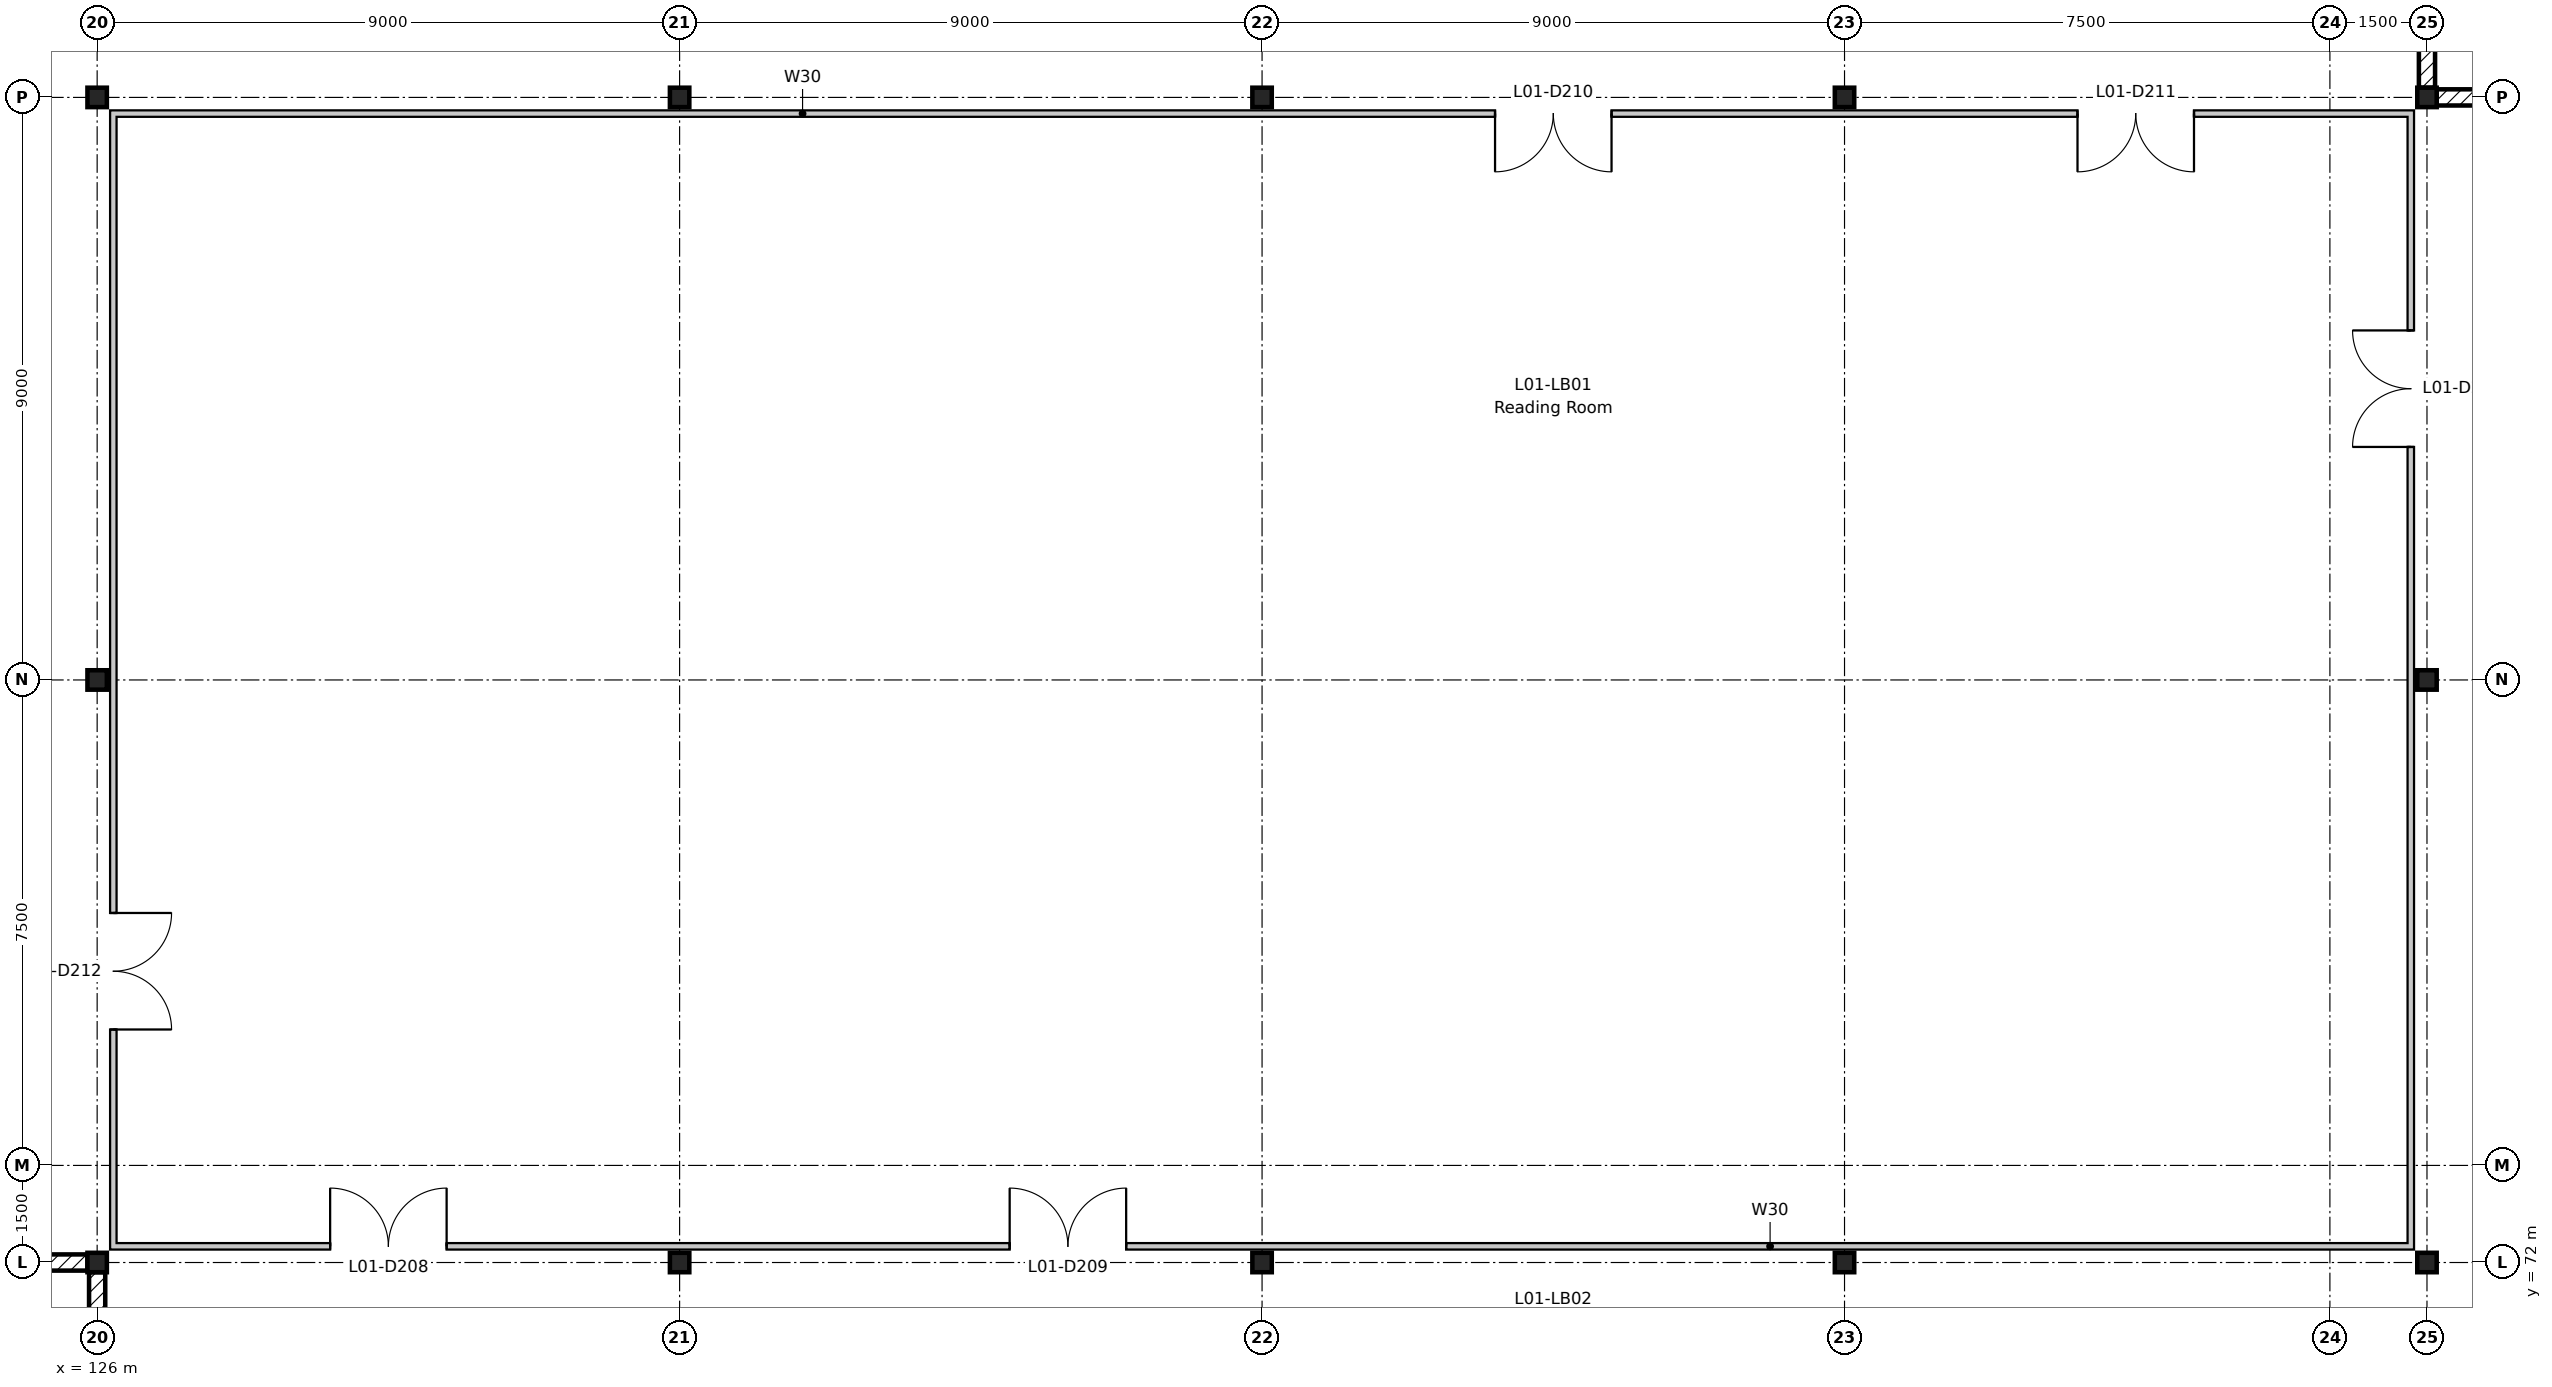
"""IFC4 building model, lengths in metres.
Left out: names, types, materials, properties, quantities, classifications, styles, units other than length and angle.
Written with IfcOpenShell. Run it as: python <this file> out.ifc"""

import sys

from ifc_helpers import new_model, si_unit, direction, frame, frame_2d, origin, origin_2d, place, context, subcontext, project, spatial, rectangle, i_section, extrude, element, fill, save


model = new_model("IFC4")
c1 = context("Model", 3, precision=1e-05, world=origin(), true_north=direction((0.0, 1.0)))
c2 = subcontext(c1, "Body", "Model", "MODEL_VIEW")
j1 = project(units=[si_unit("LENGTHUNIT", "METRE"), si_unit("PLANEANGLEUNIT", "RADIAN")], contexts=[c1])
p1 = place(None, origin())
s1 = spatial("IfcSite", under=j1, at=p1, CompositionType="ELEMENT")
p2 = place(p1, origin())
s2 = spatial("IfcBuilding", under=s1, at=p2, CompositionType="ELEMENT")
p3 = place(p2, frame((0.0, 0.0, 5.4)))
s3 = spatial("IfcBuildingStorey", under=s2, at=p3, CompositionType="ELEMENT", Elevation=5.4)
for number, where, z_axis, x_axis in (
    (1, (126.0, 72.0, -0.2), (0.0, 0.0, 1.0), (1.0, 0.0, 0.0)),
    (2, (126.0, 81.0, -0.2), (0.0, 0.0, 1.0), (1.0, 0.0, 0.0)),
    (3, (126.0, 90.0, -0.2), (0.0, 0.0, 1.0), (1.0, 0.0, 0.0)),
    (4, (135.0, 72.0, -0.2), (0.0, 0.0, 1.0), (1.0, 0.0, 0.0)),
    (5, (135.0, 90.0, -0.2), (0.0, 0.0, 1.0), (1.0, 0.0, 0.0)),
    (6, (144.0, 72.0, -0.2), (0.0, 0.0, 1.0), (1.0, 0.0, 0.0)),
    (7, (144.0, 90.0, -0.2), (0.0, 0.0, 1.0), (1.0, 0.0, 0.0)),
    (8, (153.0, 72.0, -0.2), (0.0, 0.0, 1.0), (1.0, 0.0, 0.0)),
    (9, (153.0, 90.0, -0.2), (0.0, 0.0, 1.0), (1.0, 0.0, 0.0)),
    (10, (162.0, 72.0, -0.2), (0.0, 0.0, 1.0), (1.0, 0.0, 0.0)),
    (11, (162.0, 81.0, -0.2), (0.0, 0.0, 1.0), (1.0, 0.0, 0.0)),
    (12, (162.0, 90.0, -0.2), (0.0, 0.0, 1.0), (1.0, 0.0, 0.0)),
):
    element("IfcColumn", number, at=place(p3, frame(where, z_axis=z_axis, x_axis=x_axis)), inside=s3, PredefinedType="COLUMN", context=c2, shape_type="SweptSolid", body=[
        extrude(i_section(OverallWidth=0.3, OverallDepth=0.3, WebThickness=0.011, FlangeThickness=0.019, FilletRadius=0.027, at=origin_2d()), origin(), (0.0, 0.0, 1.0), 4.5),
    ])
p4 = place(p3, frame((126.0, 63.2, 0.0), z_axis=(0.0, 0.0, 1.0), x_axis=(0.0, 1.0, 0.0)))
e13 = element("IfcWall", 13, at=p4, inside=s3, PredefinedType="SHEAR", context=c2, shape_type="SweptSolid", body=[
    extrude(rectangle(XDim=8.65, YDim=0.25, at=frame_2d((4.325, 0.0))), origin(), (0.0, 0.0, 1.0), 4.3),
])
p5 = place(p4, frame((6.7, 0.0, 0.0)))
e14 = element("IfcOpeningElement", 14, at=p5, cuts=e13, PredefinedType="OPENING", context=c2, shape_type="SweptSolid", body=[
    extrude(rectangle(XDim=1.2, YDim=2.1, at=frame_2d((0.6, 1.05))), frame((0.0, 0.135, 0.0), z_axis=(0.0, -1.0, 0.0), x_axis=(1.0, 0.0, 0.0)), (0.0, 0.0, 1.0), 0.27),
])
p6 = place(p3, frame((117.2, 72.0, 0.0), z_axis=(0.0, 0.0, 1.0), x_axis=(1.0, 0.0, 0.0)))
e15 = element("IfcWall", 15, at=p6, inside=s3, PredefinedType="SHEAR", context=c2, shape_type="SweptSolid", body=[
    extrude(rectangle(XDim=8.65, YDim=0.25, at=frame_2d((4.325, 0.0))), origin(), (0.0, 0.0, 1.0), 4.3),
])
p7 = place(p6, frame((6.6, 0.0, 0.0)))
e16 = element("IfcOpeningElement", 16, at=p7, cuts=e15, PredefinedType="OPENING", context=c2, shape_type="SweptSolid", body=[
    extrude(rectangle(XDim=1.2, YDim=2.1, at=frame_2d((0.6, 1.05))), frame((0.0, 0.135, 0.0), z_axis=(0.0, -1.0, 0.0), x_axis=(1.0, 0.0, 0.0)), (0.0, 0.0, 1.0), 0.27),
])
p8 = place(p3, frame((162.0, 98.8, 0.0), z_axis=(0.0, 0.0, 1.0), x_axis=(0.0, -1.0, 0.0)))
e17 = element("IfcWall", 17, at=p8, inside=s3, PredefinedType="SHEAR", context=c2, shape_type="SweptSolid", body=[
    extrude(rectangle(XDim=8.65, YDim=0.25, at=frame_2d((4.325, 0.0))), origin(), (0.0, 0.0, 1.0), 4.3),
])
p9 = place(p8, frame((6.7, 0.0, 0.0)))
e18 = element("IfcOpeningElement", 18, at=p9, cuts=e17, PredefinedType="OPENING", context=c2, shape_type="SweptSolid", body=[
    extrude(rectangle(XDim=1.2, YDim=2.1, at=frame_2d((0.6, 1.05))), frame((0.0, 0.135, 0.0), z_axis=(0.0, -1.0, 0.0), x_axis=(1.0, 0.0, 0.0)), (0.0, 0.0, 1.0), 0.27),
])
p10 = place(p3, frame((170.8, 90.0, 0.0), z_axis=(0.0, 0.0, 1.0), x_axis=(-1.0, 0.0, 0.0)))
e19 = element("IfcWall", 19, at=p10, inside=s3, PredefinedType="SHEAR", context=c2, shape_type="SweptSolid", body=[
    extrude(rectangle(XDim=8.65, YDim=0.25, at=frame_2d((4.325, 0.0))), origin(), (0.0, 0.0, 1.0), 4.3),
])
p11 = place(p10, frame((6.6, 0.0, 0.0)))
e20 = element("IfcOpeningElement", 20, at=p11, cuts=e19, PredefinedType="OPENING", context=c2, shape_type="SweptSolid", body=[
    extrude(rectangle(XDim=1.2, YDim=2.1, at=frame_2d((0.6, 1.05))), frame((0.0, 0.135, 0.0), z_axis=(0.0, -1.0, 0.0), x_axis=(1.0, 0.0, 0.0)), (0.0, 0.0, 1.0), 0.27),
])
p12 = place(p3, frame((126.2, 72.25, 0.0), z_axis=(0.0, 0.0, 1.0), x_axis=(1.0, 0.0, 0.0)))
e21 = element("IfcWall", 21, at=p12, inside=s3, PredefinedType="PARTITIONING", context=c2, shape_type="SweptSolid", body=[
    extrude(rectangle(XDim=35.6, YDim=0.1, at=frame_2d((17.8, 0.0))), origin(), (0.0, 0.0, 1.0), 4.3),
])
p13 = place(p12, frame((3.4, 0.0, 0.0)))
e22 = element("IfcOpeningElement", 22, at=p13, cuts=e21, PredefinedType="OPENING", context=c2, shape_type="SweptSolid", body=[
    extrude(rectangle(XDim=1.8, YDim=2.1, at=frame_2d((0.9, 1.05))), frame((0.0, 0.06, 0.0), z_axis=(0.0, -1.0, 0.0), x_axis=(1.0, 0.0, 0.0)), (0.0, 0.0, 1.0), 0.12),
])
p14 = place(p12, frame((13.9, 0.0, 0.0)))
e23 = element("IfcOpeningElement", 23, at=p14, cuts=e21, PredefinedType="OPENING", context=c2, shape_type="SweptSolid", body=[
    extrude(rectangle(XDim=1.8, YDim=2.1, at=frame_2d((0.9, 1.05))), frame((0.0, 0.06, 0.0), z_axis=(0.0, -1.0, 0.0), x_axis=(1.0, 0.0, 0.0)), (0.0, 0.0, 1.0), 0.12),
])
p15 = place(p3, frame((126.2, 89.75, 0.0), z_axis=(0.0, 0.0, 1.0), x_axis=(1.0, 0.0, 0.0)))
e24 = element("IfcWall", 24, at=p15, inside=s3, PredefinedType="PARTITIONING", context=c2, shape_type="SweptSolid", body=[
    extrude(rectangle(XDim=35.6, YDim=0.1, at=frame_2d((17.8, 0.0))), origin(), (0.0, 0.0, 1.0), 4.3),
])
p16 = place(p15, frame((21.4, 0.0, 0.0)))
e25 = element("IfcOpeningElement", 25, at=p16, cuts=e24, PredefinedType="OPENING", context=c2, shape_type="SweptSolid", body=[
    extrude(rectangle(XDim=1.8, YDim=2.1, at=frame_2d((0.9, 1.05))), frame((0.0, 0.06, 0.0), z_axis=(0.0, -1.0, 0.0), x_axis=(1.0, 0.0, 0.0)), (0.0, 0.0, 1.0), 0.12),
])
p17 = place(p15, frame((30.4, 0.0, 0.0)))
e26 = element("IfcOpeningElement", 26, at=p17, cuts=e24, PredefinedType="OPENING", context=c2, shape_type="SweptSolid", body=[
    extrude(rectangle(XDim=1.8, YDim=2.1, at=frame_2d((0.9, 1.05))), frame((0.0, 0.06, 0.0), z_axis=(0.0, -1.0, 0.0), x_axis=(1.0, 0.0, 0.0)), (0.0, 0.0, 1.0), 0.12),
])
p18 = place(p3, frame((126.25, 72.3, 0.0), z_axis=(0.0, 0.0, 1.0), x_axis=(0.0, 1.0, 0.0)))
e27 = element("IfcWall", 27, at=p18, inside=s3, PredefinedType="PARTITIONING", context=c2, shape_type="SweptSolid", body=[
    extrude(rectangle(XDim=17.4, YDim=0.1, at=frame_2d((8.7, 0.0))), origin(), (0.0, 0.0, 1.0), 4.3),
])
p19 = place(p18, frame((3.3, 0.0, 0.0)))
e28 = element("IfcOpeningElement", 28, at=p19, cuts=e27, PredefinedType="OPENING", context=c2, shape_type="SweptSolid", body=[
    extrude(rectangle(XDim=1.8, YDim=2.1, at=frame_2d((0.9, 1.05))), frame((0.0, 0.06, 0.0), z_axis=(0.0, -1.0, 0.0), x_axis=(1.0, 0.0, 0.0)), (0.0, 0.0, 1.0), 0.12),
])
p20 = place(p3, frame((161.75, 72.3, 0.0), z_axis=(0.0, 0.0, 1.0), x_axis=(0.0, 1.0, 0.0)))
e29 = element("IfcWall", 29, at=p20, inside=s3, PredefinedType="PARTITIONING", context=c2, shape_type="SweptSolid", body=[
    extrude(rectangle(XDim=17.4, YDim=0.1, at=frame_2d((8.7, 0.0))), origin(), (0.0, 0.0, 1.0), 4.3),
])
p21 = place(p20, frame((12.3, 0.0, 0.0)))
e30 = element("IfcOpeningElement", 30, at=p21, cuts=e29, PredefinedType="OPENING", context=c2, shape_type="SweptSolid", body=[
    extrude(rectangle(XDim=1.8, YDim=2.1, at=frame_2d((0.9, 1.05))), frame((0.0, 0.06, 0.0), z_axis=(0.0, -1.0, 0.0), x_axis=(1.0, 0.0, 0.0)), (0.0, 0.0, 1.0), 0.12),
])
p22 = place(p13, origin())
e31 = element("IfcDoor", 31, at=p22, inside=s3, OperationType="DOUBLE_DOOR_SINGLE_SWING", PredefinedType="DOOR", context=c2, shape_type="SweptSolid", body=[
    extrude(rectangle(XDim=1.8, YDim=2.1, at=frame_2d((0.9, 1.05))), frame((0.0, 0.025, 0.0), z_axis=(0.0, -1.0, 0.0), x_axis=(1.0, 0.0, 0.0)), (0.0, 0.0, 1.0), 0.05),
])
fill(e22, e31)
p23 = place(p14, origin())
e32 = element("IfcDoor", 32, at=p23, inside=s3, OperationType="DOUBLE_DOOR_SINGLE_SWING", PredefinedType="DOOR", context=c2, shape_type="SweptSolid", body=[
    extrude(rectangle(XDim=1.8, YDim=2.1, at=frame_2d((0.9, 1.05))), frame((0.0, 0.025, 0.0), z_axis=(0.0, -1.0, 0.0), x_axis=(1.0, 0.0, 0.0)), (0.0, 0.0, 1.0), 0.05),
])
fill(e23, e32)
p24 = place(p16, frame((1.8, 0.0, 0.0), z_axis=(0.0, 0.0, 1.0), x_axis=(-1.0, 0.0, 0.0)))
e33 = element("IfcDoor", 33, at=p24, inside=s3, OperationType="DOUBLE_DOOR_SINGLE_SWING", PredefinedType="DOOR", context=c2, shape_type="SweptSolid", body=[
    extrude(rectangle(XDim=1.8, YDim=2.1, at=frame_2d((0.9, 1.05))), frame((0.0, 0.025, 0.0), z_axis=(0.0, -1.0, 0.0), x_axis=(1.0, 0.0, 0.0)), (0.0, 0.0, 1.0), 0.05),
])
fill(e25, e33)
p25 = place(p17, frame((1.8, 0.0, 0.0), z_axis=(0.0, 0.0, 1.0), x_axis=(-1.0, 0.0, 0.0)))
e34 = element("IfcDoor", 34, at=p25, inside=s3, OperationType="DOUBLE_DOOR_SINGLE_SWING", PredefinedType="DOOR", context=c2, shape_type="SweptSolid", body=[
    extrude(rectangle(XDim=1.8, YDim=2.1, at=frame_2d((0.9, 1.05))), frame((0.0, 0.025, 0.0), z_axis=(0.0, -1.0, 0.0), x_axis=(1.0, 0.0, 0.0)), (0.0, 0.0, 1.0), 0.05),
])
fill(e26, e34)
p26 = place(p19, frame((1.8, 0.0, 0.0), z_axis=(0.0, 0.0, 1.0), x_axis=(-1.0, 0.0, 0.0)))
e35 = element("IfcDoor", 35, at=p26, inside=s3, OperationType="DOUBLE_DOOR_SINGLE_SWING", PredefinedType="DOOR", context=c2, shape_type="SweptSolid", body=[
    extrude(rectangle(XDim=1.8, YDim=2.1, at=frame_2d((0.9, 1.05))), frame((0.0, 0.025, 0.0), z_axis=(0.0, -1.0, 0.0), x_axis=(1.0, 0.0, 0.0)), (0.0, 0.0, 1.0), 0.05),
])
fill(e28, e35)
p27 = place(p21, origin())
e36 = element("IfcDoor", 36, at=p27, inside=s3, OperationType="DOUBLE_DOOR_SINGLE_SWING", PredefinedType="DOOR", context=c2, shape_type="SweptSolid", body=[
    extrude(rectangle(XDim=1.8, YDim=2.1, at=frame_2d((0.9, 1.05))), frame((0.0, 0.025, 0.0), z_axis=(0.0, -1.0, 0.0), x_axis=(1.0, 0.0, 0.0)), (0.0, 0.0, 1.0), 0.05),
])
fill(e30, e36)
save(model, sys.argv[1])
